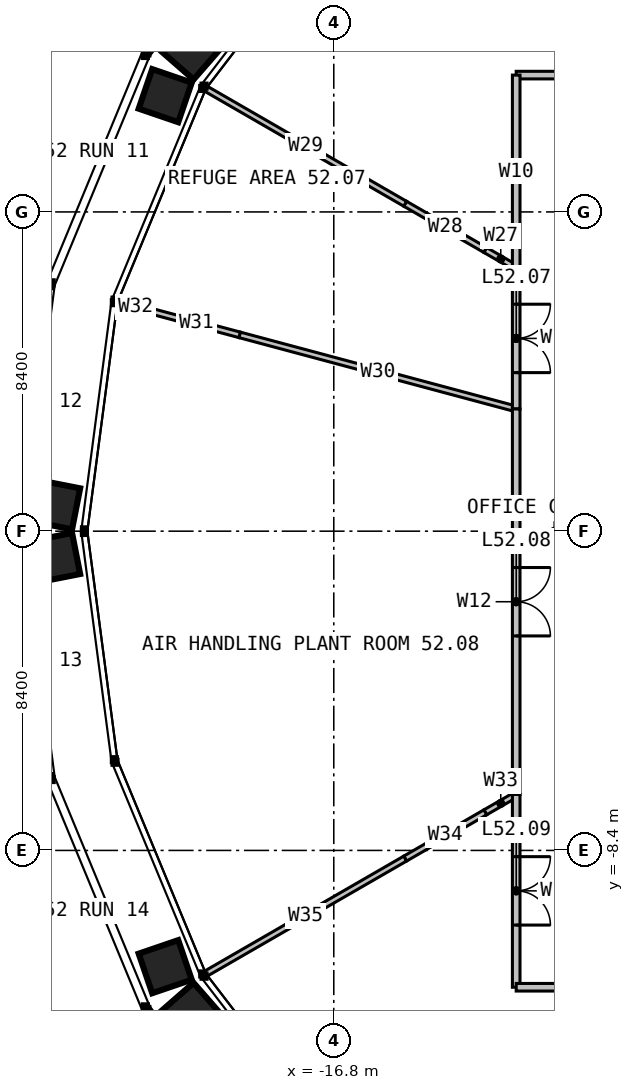
"""IFC4 building model, lengths in metres.
Left out: names, types, materials, properties, quantities, classifications, styles, units other than length and angle.
Written with IfcOpenShell. Run it as: python <this file> out.ifc"""

import sys

from ifc_helpers import new_model, si_unit, direction, frame, frame_2d, origin, place, context, subcontext, project, spatial, rectangle, extrude, element, fill, save


model = new_model("IFC4")
c1 = context("Model", 3, precision=1e-05, world=origin(), true_north=direction((0.0, 1.0)))
c2 = subcontext(c1, "Body", "Model", "MODEL_VIEW")
j1 = project(units=[si_unit("LENGTHUNIT", "METRE"), si_unit("PLANEANGLEUNIT", "RADIAN")], contexts=[c1])
p1 = place(None, origin())
s1 = spatial("IfcSite", under=j1, at=p1, CompositionType="ELEMENT")
p2 = place(p1, origin())
s2 = spatial("IfcBuilding", under=s1, at=p2, CompositionType="ELEMENT")
p3 = place(p2, frame((0.0, 0.0, 215.0)))
s3 = spatial("IfcBuildingStorey", under=s2, at=p3, CompositionType="ELEMENT", Elevation=215.0)
p4 = place(p3, frame((-6.928, 12.0, 0.0), z_axis=(0.0, 0.0, 1.0), x_axis=(-0.500008934908, 0.866020245151, 0.0)))
e1 = element("IfcWall", 1, at=p4, inside=s3, PredefinedType="PARTITIONING", context=c2, shape_type="SweptSolid", body=[
    extrude(rectangle(XDim=9.418, YDim=0.15, at=frame_2d((4.709, 0.0))), origin(), (0.0, 0.0, 1.0), 4.8),
])
p5 = place(p3, frame((-12.0, 6.928, 0.0), z_axis=(0.0, 0.0, 1.0), x_axis=(-0.866042712228, 0.499970019698, 0.0)))
e2 = element("IfcWall", 2, at=p5, inside=s3, PredefinedType="PARTITIONING", context=c2, shape_type="SweptSolid", body=[
    extrude(rectangle(XDim=0.939, YDim=0.15, at=frame_2d((0.469, 0.0))), origin(), (0.0, 0.0, 1.0), 4.8),
])
p6 = place(p3, frame((-12.813, 7.398, 0.0), z_axis=(0.0, 0.0, 1.0), x_axis=(-0.86601855109, 0.500011869027, 0.0)))
e3 = element("IfcWall", 3, at=p6, inside=s3, PredefinedType="PARTITIONING", context=c2, shape_type="SweptSolid", body=[
    extrude(rectangle(XDim=2.434, YDim=0.15, at=frame_2d((1.217, 0.0))), origin(), (0.0, 0.0, 1.0), 3.79),
])
p7 = place(p3, frame((-14.921, 8.615, 0.0), z_axis=(0.0, 0.0, 1.0), x_axis=(-0.866017437, 0.500013798622, 0.0)))
e4 = element("IfcWall", 4, at=p7, inside=s3, PredefinedType="PARTITIONING", context=c2, shape_type="SweptSolid", body=[
    extrude(rectangle(XDim=6.045, YDim=0.15, at=frame_2d((3.022, 0.0))), origin(), (0.0, 0.0, 1.0), 4.8),
])
p8 = place(p3, frame((-12.0, 3.215, 0.0), z_axis=(0.0, 0.0, 1.0), x_axis=(-0.965923894696, 0.258826253797, 0.0)))
e5 = element("IfcWall", 5, at=p8, inside=s3, PredefinedType="PARTITIONING", context=c2, shape_type="SweptSolid", body=[
    extrude(rectangle(XDim=7.534, YDim=0.15, at=frame_2d((3.767, 0.0))), origin(), (0.0, 0.0, 1.0), 4.8),
])
p9 = place(p3, frame((-19.277, 5.165, 0.0), z_axis=(0.0, 0.0, 1.0), x_axis=(-0.965936478183, 0.258779288421, 0.0)))
e6 = element("IfcWall", 6, at=p9, inside=s3, PredefinedType="PARTITIONING", context=c2, shape_type="SweptSolid", body=[
    extrude(rectangle(XDim=2.354, YDim=0.15, at=frame_2d((1.177, 0.0))), origin(), (0.0, 0.0, 1.0), 3.79),
])
p10 = place(p3, frame((-21.551, 5.774, 0.0), z_axis=(0.0, 0.0, 1.0), x_axis=(-0.965872225937, 0.25901900155, 0.0)))
e7 = element("IfcWall", 7, at=p10, inside=s3, PredefinedType="PARTITIONING", context=c2, shape_type="SweptSolid", body=[
    extrude(rectangle(XDim=0.963, YDim=0.15, at=frame_2d((0.482, 0.0))), origin(), (0.0, 0.0, 1.0), 4.8),
])
p11 = place(p3, frame((-12.0, -6.928, 0.0), z_axis=(0.0, 0.0, 1.0), x_axis=(-0.866042712228, -0.499970019698, 0.0)))
e8 = element("IfcWall", 8, at=p11, inside=s3, PredefinedType="PARTITIONING", context=c2, shape_type="SweptSolid", body=[
    extrude(rectangle(XDim=0.939, YDim=0.15, at=frame_2d((0.469, 0.0))), origin(), (0.0, 0.0, 1.0), 4.8),
])
p12 = place(p3, frame((-12.813, -7.398, 0.0), z_axis=(0.0, 0.0, 1.0), x_axis=(-0.86601855109, -0.500011869027, 0.0)))
e9 = element("IfcWall", 9, at=p12, inside=s3, PredefinedType="PARTITIONING", context=c2, shape_type="SweptSolid", body=[
    extrude(rectangle(XDim=2.434, YDim=0.15, at=frame_2d((1.217, 0.0))), origin(), (0.0, 0.0, 1.0), 3.79),
])
p13 = place(p3, frame((-14.921, -8.615, 0.0), z_axis=(0.0, 0.0, 1.0), x_axis=(-0.866017437, -0.500013798622, 0.0)))
e10 = element("IfcWall", 10, at=p13, inside=s3, PredefinedType="PARTITIONING", context=c2, shape_type="SweptSolid", body=[
    extrude(rectangle(XDim=6.045, YDim=0.15, at=frame_2d((3.022, 0.0))), origin(), (0.0, 0.0, 1.0), 4.8),
])
p14 = place(p3, frame((-6.928, -12.0, 0.0), z_axis=(0.0, 0.0, 1.0), x_axis=(-0.500008934908, -0.866020245151, 0.0)))
e11 = element("IfcWall", 11, at=p14, inside=s3, PredefinedType="PARTITIONING", context=c2, shape_type="SweptSolid", body=[
    extrude(rectangle(XDim=9.418, YDim=0.15, at=frame_2d((4.709, 0.0))), origin(), (0.0, 0.0, 1.0), 4.8),
])
p15 = place(p3, frame((-6.928, 12.0, 0.0), z_axis=(0.0, 0.0, 1.0), x_axis=(-1.0, 0.0, 0.0)))
e12 = element("IfcWall", 12, at=p15, inside=s3, PredefinedType="PARTITIONING", context=c2, shape_type="SweptSolid", body=[
    extrude(rectangle(XDim=5.072, YDim=0.2, at=frame_2d((2.536, 0.0))), origin(), (0.0, 0.0, 1.0), 4.8),
])
p16 = place(p15, frame((1.636, 0.0, 0.0)))
e13 = element("IfcOpeningElement", 13, at=p16, cuts=e12, PredefinedType="OPENING", context=c2, shape_type="SweptSolid", body=[
    extrude(rectangle(XDim=1.8, YDim=2.2, at=frame_2d((0.9, 1.1))), frame((0.0, 0.11, 0.0), z_axis=(0.0, -1.0, 0.0), x_axis=(1.0, 0.0, 0.0)), (0.0, 0.0, 1.0), 0.22),
])
p17 = place(p3, frame((-12.0, 12.0, 0.0), z_axis=(0.0, 0.0, 1.0), x_axis=(0.0, -1.0, 0.0)))
e14 = element("IfcWall", 14, at=p17, inside=s3, PredefinedType="PARTITIONING", context=c2, shape_type="SweptSolid", body=[
    extrude(rectangle(XDim=5.072, YDim=0.2, at=frame_2d((2.536, 0.0))), origin(), (0.0, 0.0, 1.0), 4.8),
])
p18 = place(p3, frame((-12.0, 6.928, 0.0), z_axis=(0.0, 0.0, 1.0), x_axis=(0.0, -1.0, 0.0)))
e15 = element("IfcWall", 15, at=p18, inside=s3, PredefinedType="PARTITIONING", context=c2, shape_type="SweptSolid", body=[
    extrude(rectangle(XDim=3.713, YDim=0.2, at=frame_2d((1.856, 0.0))), origin(), (0.0, 0.0, 1.0), 4.8),
])
p19 = place(p18, frame((0.956, 0.0, 0.0)))
e16 = element("IfcOpeningElement", 16, at=p19, cuts=e15, PredefinedType="OPENING", context=c2, shape_type="SweptSolid", body=[
    extrude(rectangle(XDim=1.8, YDim=2.2, at=frame_2d((0.9, 1.1))), frame((0.0, 0.11, 0.0), z_axis=(0.0, -1.0, 0.0), x_axis=(1.0, 0.0, 0.0)), (0.0, 0.0, 1.0), 0.22),
])
p20 = place(p3, frame((-12.0, 3.215, 0.0), z_axis=(0.0, 0.0, 1.0), x_axis=(0.0, -1.0, 0.0)))
e17 = element("IfcWall", 17, at=p20, inside=s3, PredefinedType="PARTITIONING", context=c2, shape_type="SweptSolid", body=[
    extrude(rectangle(XDim=10.144, YDim=0.2, at=frame_2d((5.072, 0.0))), origin(), (0.0, 0.0, 1.0), 4.8),
])
p21 = place(p20, frame((4.172, 0.0, 0.0)))
e18 = element("IfcOpeningElement", 18, at=p21, cuts=e17, PredefinedType="OPENING", context=c2, shape_type="SweptSolid", body=[
    extrude(rectangle(XDim=1.8, YDim=2.2, at=frame_2d((0.9, 1.1))), frame((0.0, 0.11, 0.0), z_axis=(0.0, -1.0, 0.0), x_axis=(1.0, 0.0, 0.0)), (0.0, 0.0, 1.0), 0.22),
])
p22 = place(p3, frame((-12.0, -6.928, 0.0), z_axis=(0.0, 0.0, 1.0), x_axis=(0.0, -1.0, 0.0)))
e19 = element("IfcWall", 19, at=p22, inside=s3, PredefinedType="PARTITIONING", context=c2, shape_type="SweptSolid", body=[
    extrude(rectangle(XDim=5.072, YDim=0.2, at=frame_2d((2.536, 0.0))), origin(), (0.0, 0.0, 1.0), 4.8),
])
p23 = place(p22, frame((1.636, 0.0, 0.0)))
e20 = element("IfcOpeningElement", 20, at=p23, cuts=e19, PredefinedType="OPENING", context=c2, shape_type="SweptSolid", body=[
    extrude(rectangle(XDim=1.8, YDim=2.2, at=frame_2d((0.9, 1.1))), frame((0.0, 0.11, 0.0), z_axis=(0.0, -1.0, 0.0), x_axis=(1.0, 0.0, 0.0)), (0.0, 0.0, 1.0), 0.22),
])
p24 = place(p3, frame((-12.0, -12.0, 0.0), z_axis=(0.0, 0.0, 1.0), x_axis=(1.0, 0.0, 0.0)))
e21 = element("IfcWall", 21, at=p24, inside=s3, PredefinedType="PARTITIONING", context=c2, shape_type="SweptSolid", body=[
    extrude(rectangle(XDim=5.072, YDim=0.2, at=frame_2d((2.536, 0.0))), origin(), (0.0, 0.0, 1.0), 4.8),
])
p25 = place(p19, origin())
e22 = element("IfcDoor", 22, at=p25, inside=s3, OperationType="DOUBLE_DOOR_SINGLE_SWING", PredefinedType="DOOR", context=c2, shape_type="SweptSolid", body=[
    extrude(rectangle(XDim=1.8, YDim=2.2, at=frame_2d((0.9, 1.1))), frame((0.0, 0.025, 0.0), z_axis=(0.0, -1.0, 0.0), x_axis=(1.0, 0.0, 0.0)), (0.0, 0.0, 1.0), 0.05),
])
fill(e16, e22)
p26 = place(p21, origin())
e23 = element("IfcDoor", 23, at=p26, inside=s3, OperationType="DOUBLE_DOOR_SINGLE_SWING", PredefinedType="DOOR", context=c2, shape_type="SweptSolid", body=[
    extrude(rectangle(XDim=1.8, YDim=2.2, at=frame_2d((0.9, 1.1))), frame((0.0, 0.025, 0.0), z_axis=(0.0, -1.0, 0.0), x_axis=(1.0, 0.0, 0.0)), (0.0, 0.0, 1.0), 0.05),
])
fill(e18, e23)
p27 = place(p23, origin())
e24 = element("IfcDoor", 24, at=p27, inside=s3, OperationType="DOUBLE_DOOR_SINGLE_SWING", PredefinedType="DOOR", context=c2, shape_type="SweptSolid", body=[
    extrude(rectangle(XDim=1.8, YDim=2.2, at=frame_2d((0.9, 1.1))), frame((0.0, 0.025, 0.0), z_axis=(0.0, -1.0, 0.0), x_axis=(1.0, 0.0, 0.0)), (0.0, 0.0, 1.0), 0.05),
])
fill(e20, e24)
save(model, sys.argv[1])
